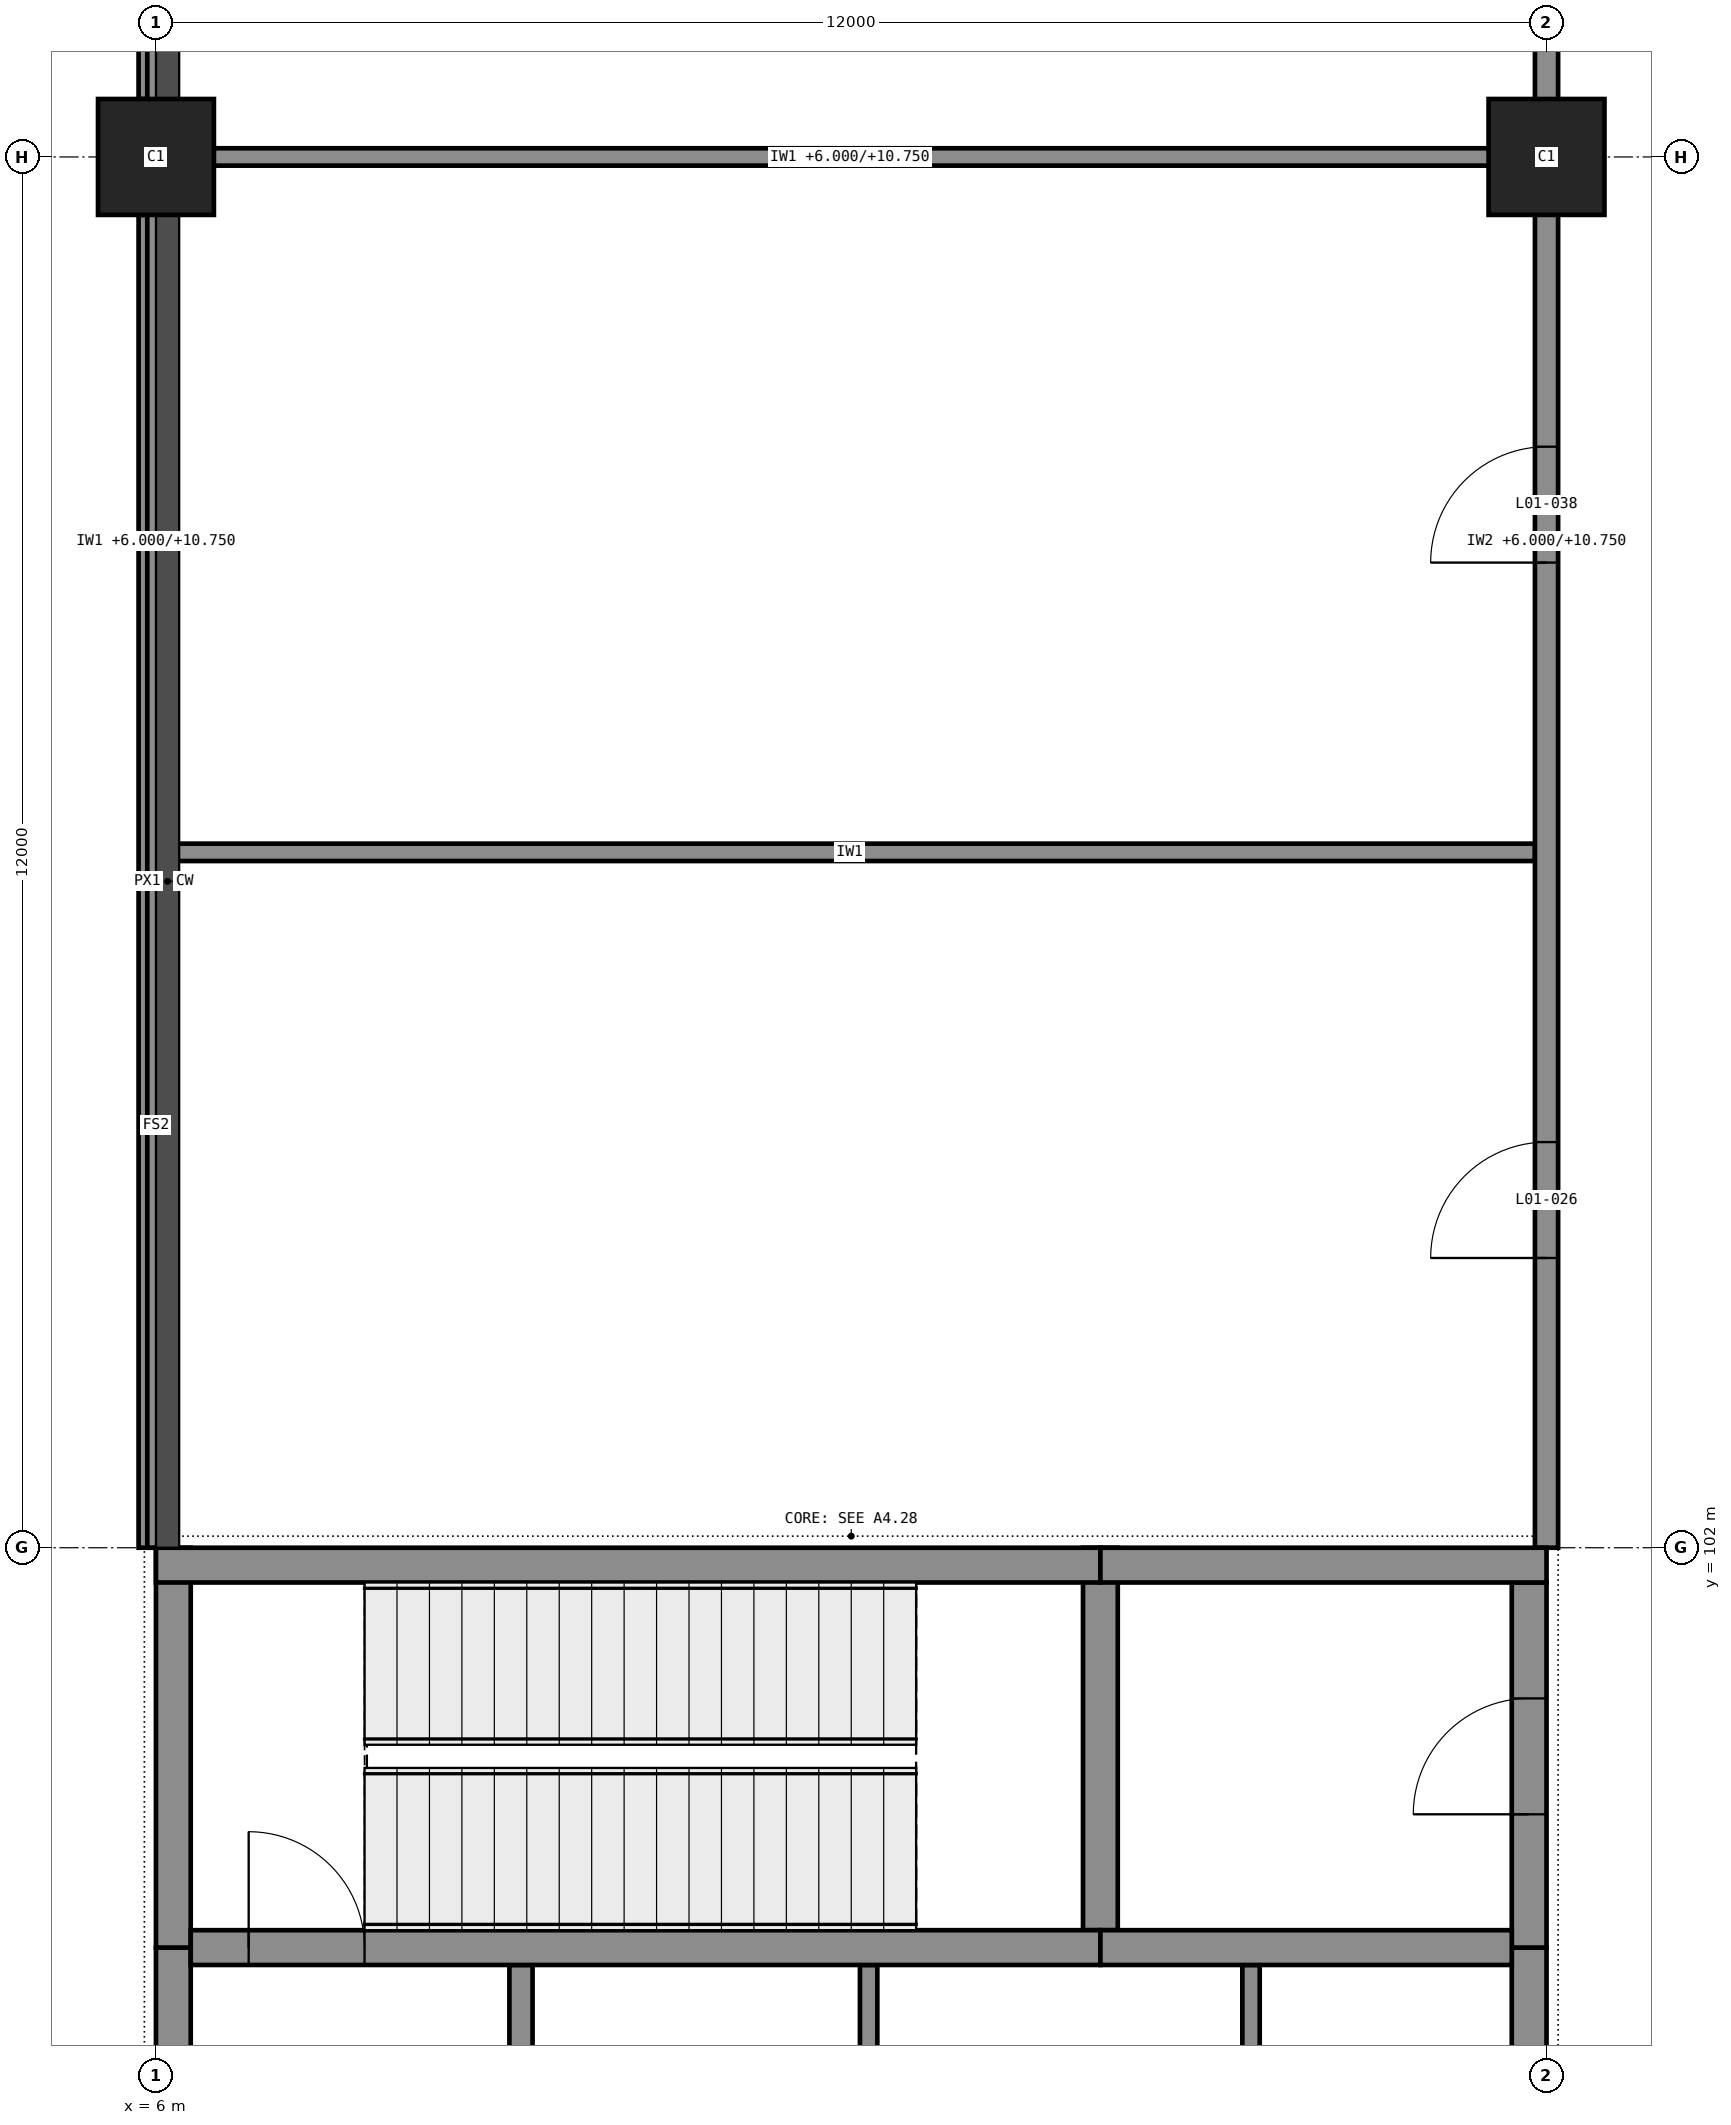
"""IFC4 building model, lengths in metres.
Left out: names, types, materials, properties, quantities, classifications, styles, units other than length and angle.
Written with IfcOpenShell. Run it as: python <this file> out.ifc"""

import sys

from ifc_helpers import new_model, si_unit, direction, frame, frame_2d, origin, origin_2d, place, context, subcontext, project, spatial, rectangle, extrude, element, fill, save


model = new_model("IFC4")
c1 = context("Model", 3, precision=1e-05, world=origin(), true_north=direction((0.0, 1.0)))
c2 = subcontext(c1, "Body", "Model", "MODEL_VIEW")
j1 = project(units=[si_unit("LENGTHUNIT", "METRE"), si_unit("PLANEANGLEUNIT", "RADIAN")], contexts=[c1])
p1 = place(None, origin())
s1 = spatial("IfcSite", under=j1, at=p1, CompositionType="ELEMENT")
p2 = place(p1, origin())
s2 = spatial("IfcBuilding", under=s1, at=p2, CompositionType="ELEMENT")
p3 = place(p2, frame((0.0, 0.0, 6.0)))
s3 = spatial("IfcBuildingStorey", under=s2, at=p3, CompositionType="ELEMENT", Elevation=6.0)
for number, where, z_axis, x_axis in (
    (1, (6.0, 114.0, 0.0), (0.0, 0.0, 1.0), (1.0, 0.0, 0.0)),
    (2, (18.0, 114.0, 0.0), (0.0, 0.0, 1.0), (1.0, 0.0, 0.0)),
):
    element("IfcColumn", number, at=place(p3, frame(where, z_axis=z_axis, x_axis=x_axis)), inside=s3, PredefinedType="COLUMN", context=c2, shape_type="SweptSolid", body=[
        extrude(rectangle(XDim=1.0, YDim=1.0, at=origin_2d()), origin(), (0.0, 0.0, 1.0), 6.0),
    ])
p4 = place(p3, frame((6.0, 101.85, 0.0), z_axis=(0.0, 0.0, 1.0), x_axis=(1.0, 0.0, 0.0)))
e3 = element("IfcWall", 3, at=p4, inside=s3, PredefinedType="SHEAR", context=c2, shape_type="SweptSolid", body=[
    extrude(rectangle(XDim=8.15, YDim=0.3, at=frame_2d((4.075, 0.0))), origin(), (0.0, 0.0, 1.0), 5.75),
])
p5 = place(p3, frame((14.15, 101.85, 0.0), z_axis=(0.0, 0.0, 1.0), x_axis=(1.0, 0.0, 0.0)))
e4 = element("IfcWall", 4, at=p5, inside=s3, PredefinedType="SHEAR", context=c2, shape_type="SweptSolid", body=[
    extrude(rectangle(XDim=3.85, YDim=0.3, at=frame_2d((1.925, 0.0))), origin(), (0.0, 0.0, 1.0), 5.75),
])
p6 = place(p3, frame((6.3, 98.55, 0.0), z_axis=(0.0, 0.0, 1.0), x_axis=(1.0, 0.0, 0.0)))
e5 = element("IfcWall", 5, at=p6, inside=s3, PredefinedType="SHEAR", context=c2, shape_type="SweptSolid", body=[
    extrude(rectangle(XDim=7.85, YDim=0.3, at=frame_2d((3.925, 0.0))), origin(), (0.0, 0.0, 1.0), 5.75),
])
p7 = place(p6, frame((0.5, 0.0, 0.0)))
e6 = element("IfcOpeningElement", 6, at=p7, cuts=e5, PredefinedType="OPENING", context=c2, shape_type="SweptSolid", body=[
    extrude(rectangle(XDim=1.0, YDim=2.1, at=frame_2d((0.5, 1.05))), frame((0.0, 0.16, 0.0), z_axis=(0.0, -1.0, 0.0), x_axis=(1.0, 0.0, 0.0)), (0.0, 0.0, 1.0), 0.32),
])
p8 = place(p3, frame((14.15, 98.55, 0.0), z_axis=(0.0, 0.0, 1.0), x_axis=(1.0, 0.0, 0.0)))
e7 = element("IfcWall", 7, at=p8, inside=s3, PredefinedType="SHEAR", context=c2, shape_type="SweptSolid", body=[
    extrude(rectangle(XDim=3.55, YDim=0.3, at=frame_2d((1.775, 0.0))), origin(), (0.0, 0.0, 1.0), 5.75),
])
p9 = place(p3, frame((6.15, 93.45, 0.0), z_axis=(0.0, 0.0, 1.0), x_axis=(0.0, 1.0, 0.0)))
e8 = element("IfcWall", 8, at=p9, inside=s3, PredefinedType="SHEAR", context=c2, shape_type="SweptSolid", body=[
    extrude(rectangle(XDim=5.1, YDim=0.3, at=frame_2d((2.55, 0.0))), origin(), (0.0, 0.0, 1.0), 5.75),
])
p10 = place(p3, frame((6.15, 98.55, 0.0), z_axis=(0.0, 0.0, 1.0), x_axis=(0.0, 1.0, 0.0)))
e9 = element("IfcWall", 9, at=p10, inside=s3, PredefinedType="SHEAR", context=c2, shape_type="SweptSolid", body=[
    extrude(rectangle(XDim=3.45, YDim=0.3, at=frame_2d((1.725, 0.0))), origin(), (0.0, 0.0, 1.0), 5.75),
])
p11 = place(p3, frame((17.85, 93.45, 0.0), z_axis=(0.0, 0.0, 1.0), x_axis=(0.0, 1.0, 0.0)))
e10 = element("IfcWall", 10, at=p11, inside=s3, PredefinedType="SHEAR", context=c2, shape_type="SweptSolid", body=[
    extrude(rectangle(XDim=5.1, YDim=0.3, at=frame_2d((2.55, 0.0))), origin(), (0.0, 0.0, 1.0), 5.75),
])
p12 = place(p11, frame((0.3, 0.0, 0.0)))
e11 = element("IfcOpeningElement", 11, at=p12, cuts=e10, PredefinedType="OPENING", context=c2, shape_type="SweptSolid", body=[
    extrude(rectangle(XDim=1.5, YDim=2.1, at=frame_2d((0.75, 1.05))), frame((0.0, 0.16, 0.0), z_axis=(0.0, -1.0, 0.0), x_axis=(1.0, 0.0, 0.0)), (0.0, 0.0, 1.0), 0.32),
])
p13 = place(p3, frame((17.85, 98.55, 0.0), z_axis=(0.0, 0.0, 1.0), x_axis=(0.0, 1.0, 0.0)))
e12 = element("IfcWall", 12, at=p13, inside=s3, PredefinedType="SHEAR", context=c2, shape_type="SweptSolid", body=[
    extrude(rectangle(XDim=3.15, YDim=0.3, at=frame_2d((1.575, 0.0))), origin(), (0.0, 0.0, 1.0), 5.75),
])
p14 = place(p13, frame((1.15, 0.0, 0.0)))
e13 = element("IfcOpeningElement", 13, at=p14, cuts=e12, PredefinedType="OPENING", context=c2, shape_type="SweptSolid", body=[
    extrude(rectangle(XDim=1.0, YDim=2.1, at=frame_2d((0.5, 1.05))), frame((0.0, 0.16, 0.0), z_axis=(0.0, -1.0, 0.0), x_axis=(1.0, 0.0, 0.0)), (0.0, 0.0, 1.0), 0.32),
])
p15 = place(p3, frame((14.15, 98.7, 0.0), z_axis=(0.0, 0.0, 1.0), x_axis=(0.0, 1.0, 0.0)))
e14 = element("IfcWall", 14, at=p15, inside=s3, PredefinedType="SHEAR", context=c2, shape_type="SweptSolid", body=[
    extrude(rectangle(XDim=3.3, YDim=0.3, at=frame_2d((1.65, 0.0))), origin(), (0.0, 0.0, 1.0), 5.75),
])
p16 = place(p3, frame((5.925, 125.5, 5.75), z_axis=(0.0, 0.0, 1.0), x_axis=(0.0, -1.0, 0.0)))
e15 = element("IfcWall", 15, at=p16, inside=s3, PredefinedType="STANDARD", context=c2, shape_type="SweptSolid", body=[
    extrude(rectangle(XDim=11.0, YDim=0.15, at=frame_2d((5.5, 0.0))), origin(), (0.0, 0.0, 1.0), 0.25),
])
p17 = place(p3, frame((5.925, 113.5, 5.75), z_axis=(0.0, 0.0, 1.0), x_axis=(0.0, -1.0, 0.0)))
e16 = element("IfcWall", 16, at=p17, inside=s3, PredefinedType="STANDARD", context=c2, shape_type="SweptSolid", body=[
    extrude(rectangle(XDim=11.5, YDim=0.15, at=frame_2d((5.75, 0.0))), origin(), (0.0, 0.0, 1.0), 0.25),
])
p18 = place(p3, frame((6.075, 108.0, 0.0), z_axis=(0.0, 0.0, 1.0), x_axis=(1.0, 0.0, 0.0)))
e17 = element("IfcWall", 17, at=p18, inside=s3, PredefinedType="PARTITIONING", context=c2, shape_type="SweptSolid", body=[
    extrude(rectangle(XDim=11.825, YDim=0.15, at=frame_2d((5.913, 0.0))), origin(), (0.0, 0.0, 1.0), 5.75),
])
p19 = place(p3, frame((6.075, 114.0, 0.0), z_axis=(0.0, 0.0, 1.0), x_axis=(1.0, 0.0, 0.0)))
e18 = element("IfcWall", 18, at=p19, inside=s3, PredefinedType="PARTITIONING", context=c2, shape_type="SweptSolid", body=[
    extrude(rectangle(XDim=11.825, YDim=0.15, at=frame_2d((5.913, 0.0))), origin(), (0.0, 0.0, 1.0), 4.75),
])
p20 = place(p3, frame((6.0, 102.0, 0.0), z_axis=(0.0, 0.0, 1.0), x_axis=(0.0, 1.0, 0.0)))
e19 = element("IfcWall", 19, at=p20, inside=s3, PredefinedType="PARTITIONING", context=c2, shape_type="SweptSolid", body=[
    extrude(rectangle(XDim=48.0, YDim=0.15, at=frame_2d((24.0, 0.0))), origin(), (0.0, 0.0, 1.0), 4.75),
])
p21 = place(p3, frame((9.15, 95.65, 0.0), z_axis=(0.0, 0.0, 1.0), x_axis=(0.0, 1.0, 0.0)))
e20 = element("IfcWall", 20, at=p21, inside=s3, PredefinedType="PARTITIONING", context=c2, shape_type="SweptSolid", body=[
    extrude(rectangle(XDim=2.75, YDim=0.2, at=frame_2d((1.375, 0.0))), origin(), (0.0, 0.0, 1.0), 5.75),
])
for number, where, z_axis, x_axis in (
    (21, (12.15, 95.65, 0.0), (0.0, 0.0, 1.0), (0.0, 1.0, 0.0)),
    (22, (15.45, 95.65, 0.0), (0.0, 0.0, 1.0), (0.0, 1.0, 0.0)),
):
    element("IfcWall", number, at=place(p3, frame(where, z_axis=z_axis, x_axis=x_axis)), inside=s3, PredefinedType="PARTITIONING", context=c2, shape_type="SweptSolid", body=[
        extrude(rectangle(XDim=2.75, YDim=0.15, at=frame_2d((1.375, 0.0))), origin(), (0.0, 0.0, 1.0), 5.75),
    ])
p22 = place(p3, frame((18.0, 102.0, 0.0), z_axis=(0.0, 0.0, 1.0), x_axis=(0.0, 1.0, 0.0)))
e23 = element("IfcWall", 23, at=p22, inside=s3, PredefinedType="PARTITIONING", context=c2, shape_type="SweptSolid", body=[
    extrude(rectangle(XDim=48.0, YDim=0.2, at=frame_2d((24.0, 0.0))), origin(), (0.0, 0.0, 1.0), 4.75),
])
p23 = place(p22, frame((2.5, 0.0, 0.0)))
e24 = element("IfcOpeningElement", 24, at=p23, cuts=e23, PredefinedType="OPENING", context=c2, shape_type="SweptSolid", body=[
    extrude(rectangle(XDim=1.0, YDim=2.1, at=frame_2d((0.5, 1.05))), frame((0.0, 0.11, 0.0), z_axis=(0.0, -1.0, 0.0), x_axis=(1.0, 0.0, 0.0)), (0.0, 0.0, 1.0), 0.22),
])
p24 = place(p22, frame((8.5, 0.0, 0.0)))
e25 = element("IfcOpeningElement", 25, at=p24, cuts=e23, PredefinedType="OPENING", context=c2, shape_type="SweptSolid", body=[
    extrude(rectangle(XDim=1.0, YDim=2.1, at=frame_2d((0.5, 1.05))), frame((0.0, 0.11, 0.0), z_axis=(0.0, -1.0, 0.0), x_axis=(1.0, 0.0, 0.0)), (0.0, 0.0, 1.0), 0.22),
])
p25 = place(p22, frame((14.5, 0.0, 0.0)))
e26 = element("IfcOpeningElement", 26, at=p25, cuts=e23, PredefinedType="OPENING", context=c2, shape_type="SweptSolid", body=[
    extrude(rectangle(XDim=1.0, YDim=2.1, at=frame_2d((0.5, 1.05))), frame((0.0, 0.11, 0.0), z_axis=(0.0, -1.0, 0.0), x_axis=(1.0, 0.0, 0.0)), (0.0, 0.0, 1.0), 0.22),
])
p26 = place(p22, frame((20.5, 0.0, 0.0)))
e27 = element("IfcOpeningElement", 27, at=p26, cuts=e23, PredefinedType="OPENING", context=c2, shape_type="SweptSolid", body=[
    extrude(rectangle(XDim=1.0, YDim=2.1, at=frame_2d((0.5, 1.05))), frame((0.0, 0.11, 0.0), z_axis=(0.0, -1.0, 0.0), x_axis=(1.0, 0.0, 0.0)), (0.0, 0.0, 1.0), 0.22),
])
p27 = place(p22, frame((26.5, 0.0, 0.0)))
e28 = element("IfcOpeningElement", 28, at=p27, cuts=e23, PredefinedType="OPENING", context=c2, shape_type="SweptSolid", body=[
    extrude(rectangle(XDim=1.0, YDim=2.1, at=frame_2d((0.5, 1.05))), frame((0.0, 0.11, 0.0), z_axis=(0.0, -1.0, 0.0), x_axis=(1.0, 0.0, 0.0)), (0.0, 0.0, 1.0), 0.22),
])
p28 = place(p22, frame((32.5, 0.0, 0.0)))
e29 = element("IfcOpeningElement", 29, at=p28, cuts=e23, PredefinedType="OPENING", context=c2, shape_type="SweptSolid", body=[
    extrude(rectangle(XDim=1.0, YDim=2.1, at=frame_2d((0.5, 1.05))), frame((0.0, 0.11, 0.0), z_axis=(0.0, -1.0, 0.0), x_axis=(1.0, 0.0, 0.0)), (0.0, 0.0, 1.0), 0.22),
])
p29 = place(p22, frame((38.5, 0.0, 0.0)))
e30 = element("IfcOpeningElement", 30, at=p29, cuts=e23, PredefinedType="OPENING", context=c2, shape_type="SweptSolid", body=[
    extrude(rectangle(XDim=1.0, YDim=2.1, at=frame_2d((0.5, 1.05))), frame((0.0, 0.11, 0.0), z_axis=(0.0, -1.0, 0.0), x_axis=(1.0, 0.0, 0.0)), (0.0, 0.0, 1.0), 0.22),
])
p30 = place(p22, frame((44.5, 0.0, 0.0)))
e31 = element("IfcOpeningElement", 31, at=p30, cuts=e23, PredefinedType="OPENING", context=c2, shape_type="SweptSolid", body=[
    extrude(rectangle(XDim=1.0, YDim=2.1, at=frame_2d((0.5, 1.05))), frame((0.0, 0.11, 0.0), z_axis=(0.0, -1.0, 0.0), x_axis=(1.0, 0.0, 0.0)), (0.0, 0.0, 1.0), 0.22),
])
p31 = place(p7, origin())
e32 = element("IfcDoor", 32, at=p31, inside=s3, OperationType="SINGLE_SWING_RIGHT", PredefinedType="DOOR", context=c2, shape_type="SweptSolid", body=[
    extrude(rectangle(XDim=1.0, YDim=2.1, at=frame_2d((0.5, 1.05))), frame((0.0, 0.025, 0.0), z_axis=(0.0, -1.0, 0.0), x_axis=(1.0, 0.0, 0.0)), (0.0, 0.0, 1.0), 0.05),
])
fill(e6, e32)
p32 = place(p14, origin())
e33 = element("IfcDoor", 33, at=p32, inside=s3, OperationType="SINGLE_SWING_RIGHT", PredefinedType="DOOR", context=c2, shape_type="SweptSolid", body=[
    extrude(rectangle(XDim=1.0, YDim=2.1, at=frame_2d((0.5, 1.05))), frame((0.0, 0.025, 0.0), z_axis=(0.0, -1.0, 0.0), x_axis=(1.0, 0.0, 0.0)), (0.0, 0.0, 1.0), 0.05),
])
fill(e13, e33)
p33 = place(p23, origin())
e34 = element("IfcDoor", 34, at=p33, inside=s3, OperationType="SINGLE_SWING_RIGHT", PredefinedType="DOOR", context=c2, shape_type="SweptSolid", body=[
    extrude(rectangle(XDim=1.0, YDim=2.1, at=frame_2d((0.5, 1.05))), frame((0.0, 0.025, 0.0), z_axis=(0.0, -1.0, 0.0), x_axis=(1.0, 0.0, 0.0)), (0.0, 0.0, 1.0), 0.05),
])
fill(e24, e34)
p34 = place(p24, origin())
e35 = element("IfcDoor", 35, at=p34, inside=s3, OperationType="SINGLE_SWING_RIGHT", PredefinedType="DOOR", context=c2, shape_type="SweptSolid", body=[
    extrude(rectangle(XDim=1.0, YDim=2.1, at=frame_2d((0.5, 1.05))), frame((0.0, 0.025, 0.0), z_axis=(0.0, -1.0, 0.0), x_axis=(1.0, 0.0, 0.0)), (0.0, 0.0, 1.0), 0.05),
])
fill(e25, e35)
save(model, sys.argv[1])
